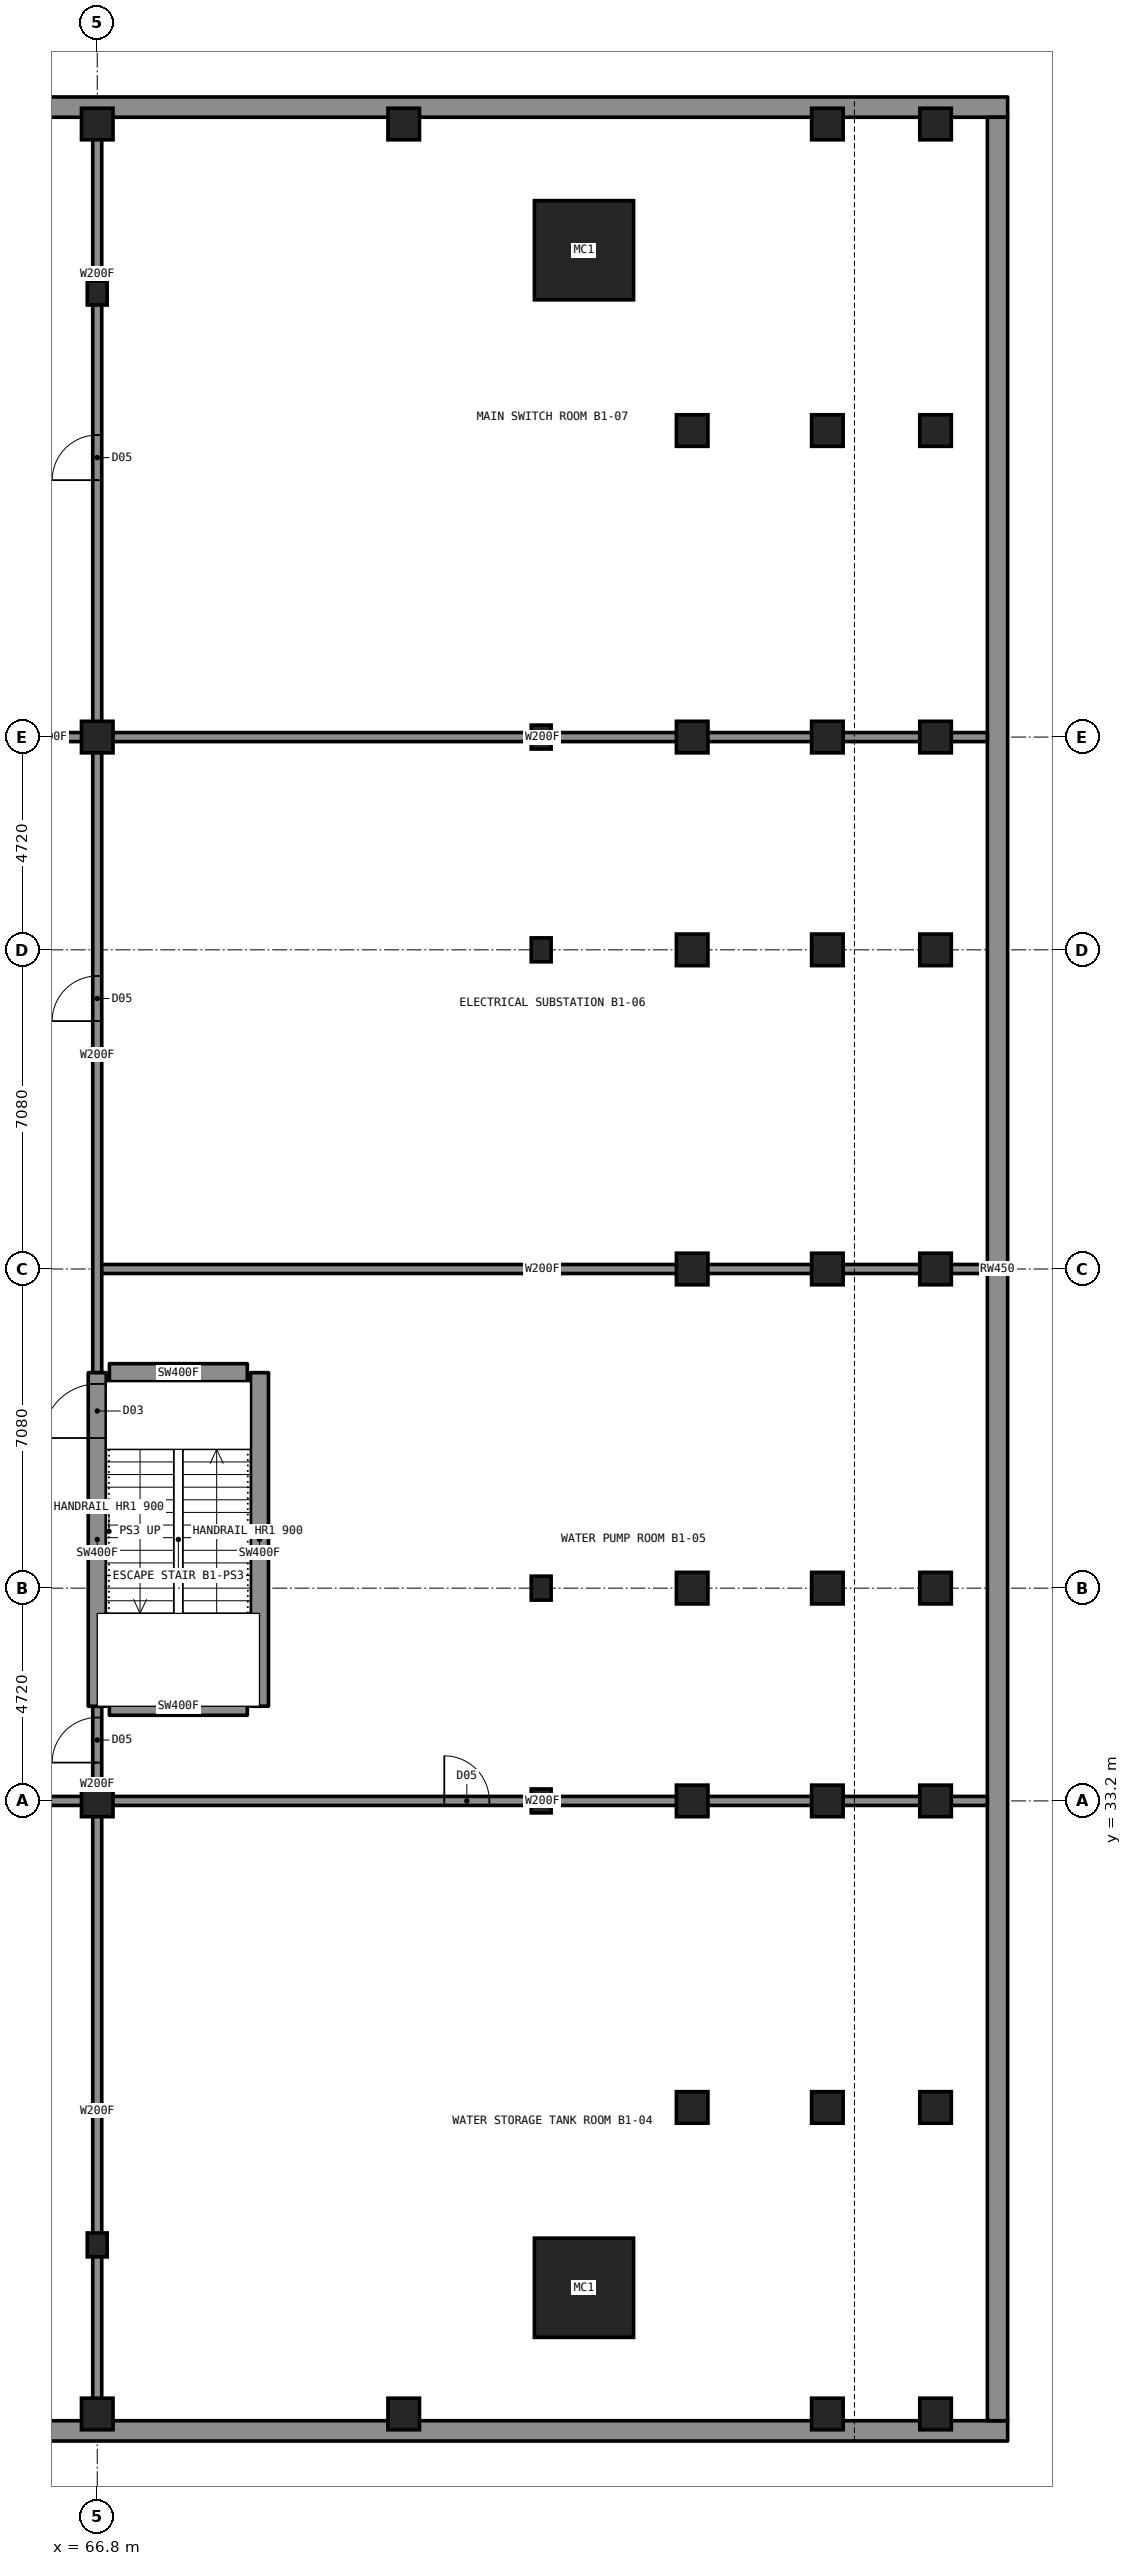
"""IFC4 building model, lengths in metres.
Left out: names, types, materials, properties, quantities, classifications, styles, units other than length and angle.
Written with IfcOpenShell. Run it as: python <this file> out.ifc"""

import sys

from ifc_helpers import new_model, si_unit, direction, frame, frame_2d, origin, origin_2d, place, context, subcontext, project, spatial, rectangle, hollow_rectangle, i_section, extrude, element, fill, save


model = new_model("IFC4")
c1 = context("Model", 3, precision=1e-05, world=origin(), true_north=direction((0.0, 1.0)))
c2 = subcontext(c1, "Body", "Model", "MODEL_VIEW")
j1 = project(units=[si_unit("LENGTHUNIT", "METRE"), si_unit("PLANEANGLEUNIT", "RADIAN")], contexts=[c1])
p1 = place(None, origin())
s1 = spatial("IfcSite", under=j1, at=p1, CompositionType="ELEMENT")
p2 = place(p1, origin())
s2 = spatial("IfcBuilding", under=s1, at=p2, CompositionType="ELEMENT")
p3 = place(p2, frame((0.0, 0.0, -5.0)))
s3 = spatial("IfcBuildingStorey", under=s2, at=p3, CompositionType="ELEMENT", Elevation=-5.0)
for number, where, z_axis, x_axis in (
    (1, (66.8, 23.35, 0.0), (0.0, 0.0, 1.0), (1.0, 0.0, 0.0)),
    (2, (66.8, 66.65, 0.0), (0.0, 0.0, 1.0), (1.0, 0.0, 0.0)),
    (3, (76.65, 33.2, 0.0), (0.0, 0.0, 1.0), (1.0, 0.0, 0.0)),
    (4, (76.65, 37.92, 0.0), (0.0, 0.0, 1.0), (1.0, 0.0, 0.0)),
    (5, (76.65, 52.08, 0.0), (0.0, 0.0, 1.0), (1.0, 0.0, 0.0)),
    (6, (76.65, 56.8, 0.0), (0.0, 0.0, 1.0), (1.0, 0.0, 0.0)),
):
    element("IfcColumn", number, at=place(p3, frame(where, z_axis=z_axis, x_axis=x_axis)), inside=s3, PredefinedType="COLUMN", context=c2, shape_type="SweptSolid", body=[
        extrude(i_section(OverallWidth=0.442, OverallDepth=0.531, WebThickness=0.066, FlangeThickness=0.106, at=origin_2d()), origin(), (0.0, 0.0, 1.0), 5.0),
    ])
for number, where, z_axis, x_axis in (
    (7, (66.8, 33.2, 0.0), (0.0, 0.0, 1.0), (1.0, 0.0, 0.0)),
    (8, (66.8, 56.8, 0.0), (0.0, 0.0, 1.0), (1.0, 0.0, 0.0)),
):
    element("IfcColumn", number, at=place(p3, frame(where, z_axis=z_axis, x_axis=x_axis)), inside=s3, PredefinedType="COLUMN", context=c2, shape_type="SweptSolid", body=[
        extrude(hollow_rectangle(XDim=0.7, YDim=0.7, WallThickness=0.06, at=origin_2d()), origin(), (0.0, 0.0, 1.0), 5.0),
    ])
for number, where, z_axis, x_axis in (
    (9, (77.6, 67.6, 0.0), (0.0, 0.0, 1.0), (1.0, 0.0, 0.0)),
    (10, (77.6, 22.4, 0.0), (0.0, 0.0, 1.0), (1.0, 0.0, 0.0)),
):
    element("IfcColumn", number, at=place(p3, frame(where, z_axis=z_axis, x_axis=x_axis)), inside=s3, PredefinedType="COLUMN", context=c2, shape_type="SweptSolid", body=[
        extrude(hollow_rectangle(XDim=2.2, YDim=2.2, WallThickness=0.15, at=origin_2d()), origin(), (0.0, 0.0, 1.0), 5.0),
    ])
for number, where, z_axis, x_axis in (
    (11, (66.8, 19.6, 0.0), (0.0, 0.0, 1.0), (1.0, 0.0, 0.0)),
    (12, (66.8, 70.4, 0.0), (0.0, 0.0, 1.0), (1.0, 0.0, 0.0)),
    (13, (73.6, 19.6, 0.0), (0.0, 0.0, 1.0), (1.0, 0.0, 0.0)),
    (14, (73.6, 70.4, 0.0), (0.0, 0.0, 1.0), (1.0, 0.0, 0.0)),
    (15, (80.0, 26.4, 0.0), (0.0, 0.0, 1.0), (1.0, 0.0, 0.0)),
    (16, (80.0, 33.2, 0.0), (0.0, 0.0, 1.0), (1.0, 0.0, 0.0)),
    (17, (80.0, 37.92, 0.0), (0.0, 0.0, 1.0), (1.0, 0.0, 0.0)),
    (18, (80.0, 45.0, 0.0), (0.0, 0.0, 1.0), (1.0, 0.0, 0.0)),
    (19, (80.0, 52.08, 0.0), (0.0, 0.0, 1.0), (1.0, 0.0, 0.0)),
    (20, (80.0, 56.8, 0.0), (0.0, 0.0, 1.0), (1.0, 0.0, 0.0)),
    (21, (80.0, 63.6, 0.0), (0.0, 0.0, 1.0), (1.0, 0.0, 0.0)),
    (22, (83.0, 19.6, 0.0), (0.0, 0.0, 1.0), (1.0, 0.0, 0.0)),
    (23, (83.0, 26.4, 0.0), (0.0, 0.0, 1.0), (1.0, 0.0, 0.0)),
    (24, (83.0, 33.2, 0.0), (0.0, 0.0, 1.0), (1.0, 0.0, 0.0)),
    (25, (83.0, 37.92, 0.0), (0.0, 0.0, 1.0), (1.0, 0.0, 0.0)),
    (26, (83.0, 45.0, 0.0), (0.0, 0.0, 1.0), (1.0, 0.0, 0.0)),
    (27, (83.0, 52.08, 0.0), (0.0, 0.0, 1.0), (1.0, 0.0, 0.0)),
    (28, (83.0, 56.8, 0.0), (0.0, 0.0, 1.0), (1.0, 0.0, 0.0)),
    (29, (83.0, 63.6, 0.0), (0.0, 0.0, 1.0), (1.0, 0.0, 0.0)),
    (30, (83.0, 70.4, 0.0), (0.0, 0.0, 1.0), (1.0, 0.0, 0.0)),
    (31, (85.4, 19.6, 0.0), (0.0, 0.0, 1.0), (1.0, 0.0, 0.0)),
    (32, (85.4, 26.4, 0.0), (0.0, 0.0, 1.0), (1.0, 0.0, 0.0)),
    (33, (85.4, 33.2, 0.0), (0.0, 0.0, 1.0), (1.0, 0.0, 0.0)),
    (34, (85.4, 37.92, 0.0), (0.0, 0.0, 1.0), (1.0, 0.0, 0.0)),
    (35, (85.4, 45.0, 0.0), (0.0, 0.0, 1.0), (1.0, 0.0, 0.0)),
    (36, (85.4, 52.08, 0.0), (0.0, 0.0, 1.0), (1.0, 0.0, 0.0)),
    (37, (85.4, 56.8, 0.0), (0.0, 0.0, 1.0), (1.0, 0.0, 0.0)),
    (38, (85.4, 63.6, 0.0), (0.0, 0.0, 1.0), (1.0, 0.0, 0.0)),
    (39, (85.4, 70.4, 0.0), (0.0, 0.0, 1.0), (1.0, 0.0, 0.0)),
):
    element("IfcColumn", number, at=place(p3, frame(where, z_axis=z_axis, x_axis=x_axis)), inside=s3, PredefinedType="COLUMN", context=c2, shape_type="SweptSolid", body=[
        extrude(rectangle(XDim=0.7, YDim=0.7, at=origin_2d()), origin(), (0.0, 0.0, 1.0), 5.0),
    ])
for number, where, z_axis, x_axis in (
    (40, (23.0, 70.775, 0.0), (0.0, 0.0, 1.0), (1.0, 0.0, 0.0)),
    (41, (23.0, 19.225, 0.0), (0.0, 0.0, 1.0), (1.0, 0.0, 0.0)),
):
    element("IfcWall", number, at=place(p3, frame(where, z_axis=z_axis, x_axis=x_axis)), inside=s3, PredefinedType="SOLIDWALL", context=c2, shape_type="SweptSolid", body=[
        extrude(rectangle(XDim=64.0, YDim=0.45, at=frame_2d((32.0, 0.0))), origin(), (0.0, 0.0, 1.0), 5.0),
    ])
p4 = place(p3, frame((86.775, 19.45, 0.0), z_axis=(0.0, 0.0, 1.0), x_axis=(0.0, 1.0, 0.0)))
e42 = element("IfcWall", 42, at=p4, inside=s3, PredefinedType="SOLIDWALL", context=c2, shape_type="SweptSolid", body=[
    extrude(rectangle(XDim=51.1, YDim=0.45, at=frame_2d((25.55, 0.0))), origin(), (0.0, 0.0, 1.0), 5.0),
])
p5 = place(p3, frame((52.7, 33.2, 0.0), z_axis=(0.0, 0.0, 1.0), x_axis=(1.0, 0.0, 0.0)))
e43 = element("IfcWall", 43, at=p5, inside=s3, PredefinedType="PARTITIONING", context=c2, shape_type="SweptSolid", body=[
    extrude(rectangle(XDim=14.1, YDim=0.2, at=frame_2d((7.05, 0.0))), origin(), (0.0, 0.0, 1.0), 4.6),
])
p6 = place(p3, frame((66.8, 33.2, 0.0), z_axis=(0.0, 0.0, 1.0), x_axis=(1.0, 0.0, 0.0)))
e44 = element("IfcWall", 44, at=p6, inside=s3, PredefinedType="PARTITIONING", context=c2, shape_type="SweptSolid", body=[
    extrude(rectangle(XDim=19.75, YDim=0.2, at=frame_2d((9.875, 0.0))), origin(), (0.0, 0.0, 1.0), 4.6),
])
p7 = place(p6, frame((7.7, 0.0, 0.0)))
e45 = element("IfcOpeningElement", 45, at=p7, cuts=e44, PredefinedType="OPENING", context=c2, shape_type="SweptSolid", body=[
    extrude(rectangle(XDim=1.0, YDim=2.1, at=frame_2d((0.5, 1.05))), frame((0.0, 0.11, 0.0), z_axis=(0.0, -1.0, 0.0), x_axis=(1.0, 0.0, 0.0)), (0.0, 0.0, 1.0), 0.22),
])
for number, where, z_axis, x_axis in (
    (46, (67.07, 42.7, 0.0), (0.0, 0.0, 1.0), (1.0, 0.0, 0.0)),
    (47, (67.07, 35.3, 0.0), (0.0, 0.0, 1.0), (1.0, 0.0, 0.0)),
):
    element("IfcWall", number, at=place(p3, frame(where, z_axis=z_axis, x_axis=x_axis)), inside=s3, PredefinedType="SHEAR", context=c2, shape_type="SweptSolid", body=[
        extrude(rectangle(XDim=3.06, YDim=0.4, at=frame_2d((1.53, 0.0))), origin(), (0.0, 0.0, 1.0), 5.0),
    ])
p8 = place(p3, frame((66.8, 45.0, 0.0), z_axis=(0.0, 0.0, 1.0), x_axis=(1.0, 0.0, 0.0)))
e48 = element("IfcWall", 48, at=p8, inside=s3, PredefinedType="PARTITIONING", context=c2, shape_type="SweptSolid", body=[
    extrude(rectangle(XDim=19.75, YDim=0.2, at=frame_2d((9.875, 0.0))), origin(), (0.0, 0.0, 1.0), 4.6),
])
p9 = place(p3, frame((64.7, 56.8, 0.0), z_axis=(0.0, 0.0, 1.0), x_axis=(1.0, 0.0, 0.0)))
e49 = element("IfcWall", 49, at=p9, inside=s3, PredefinedType="PARTITIONING", context=c2, shape_type="SweptSolid", body=[
    extrude(rectangle(XDim=2.1, YDim=0.2, at=frame_2d((1.05, 0.0))), origin(), (0.0, 0.0, 1.0), 4.6),
])
p10 = place(p3, frame((66.8, 56.8, 0.0), z_axis=(0.0, 0.0, 1.0), x_axis=(1.0, 0.0, 0.0)))
e50 = element("IfcWall", 50, at=p10, inside=s3, PredefinedType="PARTITIONING", context=c2, shape_type="SweptSolid", body=[
    extrude(rectangle(XDim=19.75, YDim=0.2, at=frame_2d((9.875, 0.0))), origin(), (0.0, 0.0, 1.0), 4.6),
])
p11 = place(p3, frame((66.8, 33.2, 0.0), z_axis=(0.0, 0.0, 1.0), x_axis=(0.0, 1.0, 0.0)))
e51 = element("IfcWall", 51, at=p11, inside=s3, PredefinedType="PARTITIONING", context=c2, shape_type="SweptSolid", body=[
    extrude(rectangle(XDim=2.1, YDim=0.2, at=frame_2d((1.05, 0.0))), origin(), (0.0, 0.0, 1.0), 4.6),
])
p12 = place(p11, frame((0.85, 0.0, 0.0)))
e52 = element("IfcOpeningElement", 52, at=p12, cuts=e51, PredefinedType="OPENING", context=c2, shape_type="SweptSolid", body=[
    extrude(rectangle(XDim=1.0, YDim=2.1, at=frame_2d((0.5, 1.05))), frame((0.0, 0.11, 0.0), z_axis=(0.0, -1.0, 0.0), x_axis=(1.0, 0.0, 0.0)), (0.0, 0.0, 1.0), 0.22),
])
p13 = place(p3, frame((66.8, 42.7, 0.0), z_axis=(0.0, 0.0, 1.0), x_axis=(0.0, 1.0, 0.0)))
e53 = element("IfcWall", 53, at=p13, inside=s3, PredefinedType="PARTITIONING", context=c2, shape_type="SweptSolid", body=[
    extrude(rectangle(XDim=14.1, YDim=0.2, at=frame_2d((7.05, 0.0))), origin(), (0.0, 0.0, 1.0), 4.6),
])
p14 = place(p13, frame((7.8, 0.0, 0.0)))
e54 = element("IfcOpeningElement", 54, at=p14, cuts=e53, PredefinedType="OPENING", context=c2, shape_type="SweptSolid", body=[
    extrude(rectangle(XDim=1.0, YDim=2.1, at=frame_2d((0.5, 1.05))), frame((0.0, 0.11, 0.0), z_axis=(0.0, -1.0, 0.0), x_axis=(1.0, 0.0, 0.0)), (0.0, 0.0, 1.0), 0.22),
])
p15 = place(p3, frame((66.8, 19.45, 0.0), z_axis=(0.0, 0.0, 1.0), x_axis=(0.0, 1.0, 0.0)))
e55 = element("IfcWall", 55, at=p15, inside=s3, PredefinedType="PARTITIONING", context=c2, shape_type="SweptSolid", body=[
    extrude(rectangle(XDim=13.75, YDim=0.2, at=frame_2d((6.875, 0.0))), origin(), (0.0, 0.0, 1.0), 4.6),
])
p16 = place(p3, frame((66.8, 56.8, 0.0), z_axis=(0.0, 0.0, 1.0), x_axis=(0.0, 1.0, 0.0)))
e56 = element("IfcWall", 56, at=p16, inside=s3, PredefinedType="PARTITIONING", context=c2, shape_type="SweptSolid", body=[
    extrude(rectangle(XDim=13.75, YDim=0.2, at=frame_2d((6.875, 0.0))), origin(), (0.0, 0.0, 1.0), 4.6),
])
p17 = place(p16, frame((5.7, 0.0, 0.0)))
e57 = element("IfcOpeningElement", 57, at=p17, cuts=e56, PredefinedType="OPENING", context=c2, shape_type="SweptSolid", body=[
    extrude(rectangle(XDim=1.0, YDim=2.1, at=frame_2d((0.5, 1.05))), frame((0.0, 0.11, 0.0), z_axis=(0.0, -1.0, 0.0), x_axis=(1.0, 0.0, 0.0)), (0.0, 0.0, 1.0), 0.22),
])
p18 = place(p3, frame((66.8, 35.3, 0.0), z_axis=(0.0, 0.0, 1.0), x_axis=(0.0, 1.0, 0.0)))
e58 = element("IfcWall", 58, at=p18, inside=s3, PredefinedType="SHEAR", context=c2, shape_type="SweptSolid", body=[
    extrude(rectangle(XDim=7.4, YDim=0.4, at=frame_2d((3.7, 0.0))), origin(), (0.0, 0.0, 1.0), 5.0),
])
p19 = place(p18, frame((5.95, 0.0, 0.0)))
e59 = element("IfcOpeningElement", 59, at=p19, cuts=e58, PredefinedType="OPENING", context=c2, shape_type="SweptSolid", body=[
    extrude(rectangle(XDim=1.2, YDim=2.2, at=frame_2d((0.6, 1.1))), frame((0.0, 0.21, 0.0), z_axis=(0.0, -1.0, 0.0), x_axis=(1.0, 0.0, 0.0)), (0.0, 0.0, 1.0), 0.42),
])
p20 = place(p3, frame((70.4, 35.3, 0.0), z_axis=(0.0, 0.0, 1.0), x_axis=(0.0, 1.0, 0.0)))
e60 = element("IfcWall", 60, at=p20, inside=s3, PredefinedType="SHEAR", context=c2, shape_type="SweptSolid", body=[
    extrude(rectangle(XDim=7.4, YDim=0.4, at=frame_2d((3.7, 0.0))), origin(), (0.0, 0.0, 1.0), 5.0),
])
p21 = place(p19, origin())
e61 = element("IfcDoor", 61, at=p21, inside=s3, OperationType="SINGLE_SWING_LEFT", PredefinedType="DOOR", context=c2, shape_type="SweptSolid", body=[
    extrude(rectangle(XDim=1.2, YDim=2.2, at=frame_2d((0.6, 1.1))), frame((0.0, 0.025, 0.0), z_axis=(0.0, -1.0, 0.0), x_axis=(1.0, 0.0, 0.0)), (0.0, 0.0, 1.0), 0.05),
])
fill(e59, e61)
p22 = place(p7, origin())
e62 = element("IfcDoor", 62, at=p22, inside=s3, OperationType="SINGLE_SWING_LEFT", PredefinedType="DOOR", context=c2, shape_type="SweptSolid", body=[
    extrude(rectangle(XDim=1.0, YDim=2.1, at=frame_2d((0.5, 1.05))), frame((0.0, 0.025, 0.0), z_axis=(0.0, -1.0, 0.0), x_axis=(1.0, 0.0, 0.0)), (0.0, 0.0, 1.0), 0.05),
])
fill(e45, e62)
p23 = place(p12, origin())
e63 = element("IfcDoor", 63, at=p23, inside=s3, OperationType="SINGLE_SWING_LEFT", PredefinedType="DOOR", context=c2, shape_type="SweptSolid", body=[
    extrude(rectangle(XDim=1.0, YDim=2.1, at=frame_2d((0.5, 1.05))), frame((0.0, 0.025, 0.0), z_axis=(0.0, -1.0, 0.0), x_axis=(1.0, 0.0, 0.0)), (0.0, 0.0, 1.0), 0.05),
])
fill(e52, e63)
p24 = place(p14, origin())
e64 = element("IfcDoor", 64, at=p24, inside=s3, OperationType="SINGLE_SWING_LEFT", PredefinedType="DOOR", context=c2, shape_type="SweptSolid", body=[
    extrude(rectangle(XDim=1.0, YDim=2.1, at=frame_2d((0.5, 1.05))), frame((0.0, 0.025, 0.0), z_axis=(0.0, -1.0, 0.0), x_axis=(1.0, 0.0, 0.0)), (0.0, 0.0, 1.0), 0.05),
])
fill(e54, e64)
p25 = place(p17, origin())
e65 = element("IfcDoor", 65, at=p25, inside=s3, OperationType="SINGLE_SWING_LEFT", PredefinedType="DOOR", context=c2, shape_type="SweptSolid", body=[
    extrude(rectangle(XDim=1.0, YDim=2.1, at=frame_2d((0.5, 1.05))), frame((0.0, 0.025, 0.0), z_axis=(0.0, -1.0, 0.0), x_axis=(1.0, 0.0, 0.0)), (0.0, 0.0, 1.0), 0.05),
])
fill(e57, e65)
save(model, sys.argv[1])
